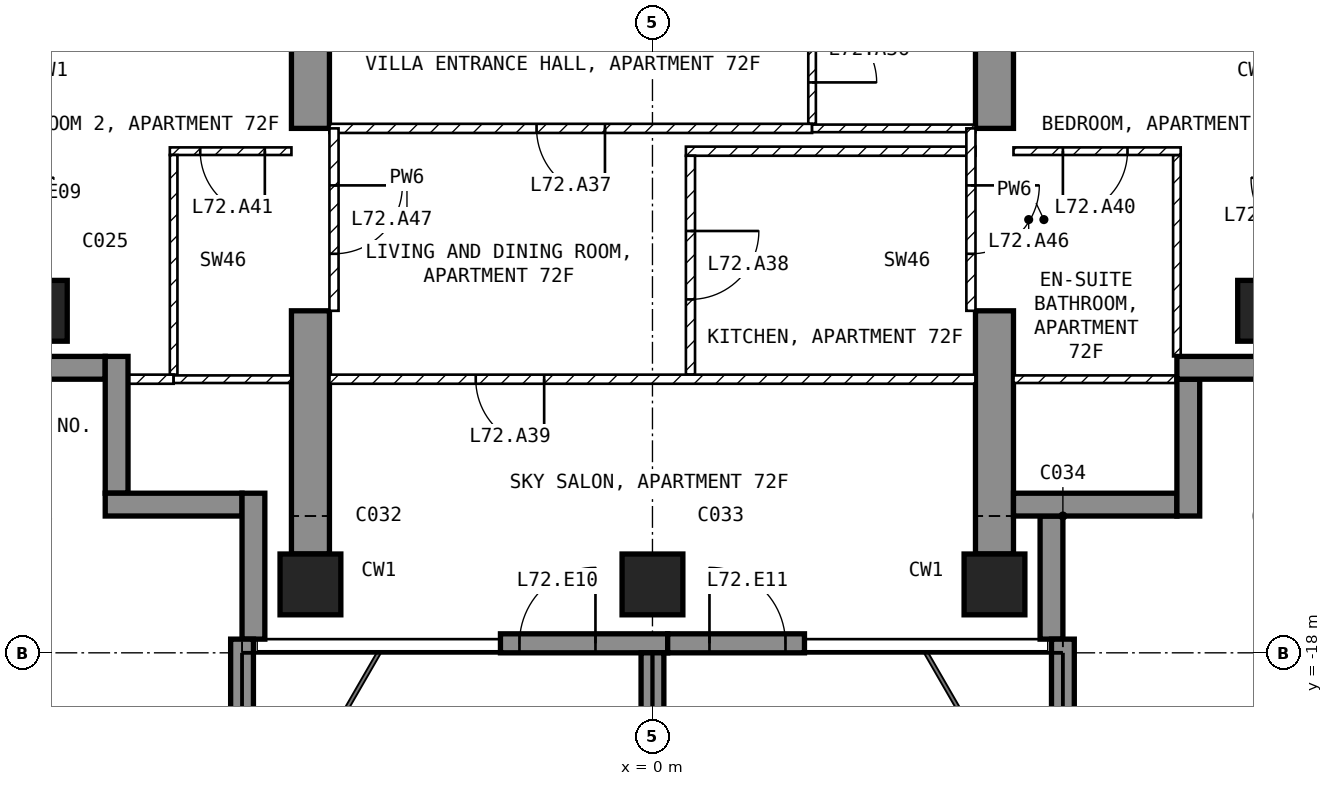
"""IFC4 building model, lengths in metres.
Left out: names, types, materials, properties, quantities, classifications, styles, units other than length and angle.
Written with IfcOpenShell. Run it as: python <this file> out.ifc"""

import sys

from ifc_helpers import new_model, si_unit, direction, frame, frame_2d, origin, origin_2d, place, context, subcontext, project, spatial, polyline, rectangle, outline, extrude, element, fill, save


model = new_model("IFC4")
c1 = context("Model", 3, precision=1e-05, world=origin(), true_north=direction((0.0, 1.0)))
c2 = subcontext(c1, "Body", "Model", "MODEL_VIEW")
j1 = project(units=[si_unit("LENGTHUNIT", "METRE"), si_unit("PLANEANGLEUNIT", "RADIAN")], contexts=[c1])
p1 = place(None, origin())
s1 = spatial("IfcSite", under=j1, at=p1, CompositionType="ELEMENT")
p2 = place(p1, origin())
s2 = spatial("IfcBuilding", under=s1, at=p2, CompositionType="ELEMENT")
p3 = place(p2, frame((0.0, 0.0, 281.5)))
s3 = spatial("IfcBuildingStorey", under=s2, at=p3, CompositionType="ELEMENT", Elevation=281.5)
for number, where, z_axis, x_axis in (
    (1, (-8.1, -13.5, -0.25), (0.0, 0.0, 1.0), (1.0, 0.0, 0.0)),
    (2, (-4.5, -17.1, -0.25), (0.0, 0.0, 1.0), (1.0, 0.0, 0.0)),
    (3, (0.0, -17.1, -0.25), (0.0, 0.0, 1.0), (1.0, 0.0, 0.0)),
    (4, (4.5, -17.1, -0.25), (0.0, 0.0, 1.0), (1.0, 0.0, 0.0)),
    (5, (8.1, -13.5, -0.25), (0.0, 0.0, 1.0), (1.0, 0.0, 0.0)),
):
    element("IfcColumn", number, at=place(p3, frame(where, z_axis=z_axis, x_axis=x_axis)), inside=s3, PredefinedType="COLUMN", context=c2, shape_type="SweptSolid", body=[
        extrude(rectangle(XDim=0.8, YDim=0.8, at=origin_2d()), origin(), (0.0, 0.0, 1.0), 3.45),
    ])
for number, where, z_axis, x_axis in (
    (6, (-4.75, -16.7, -0.25), (1.0, 0.0, 0.0), (0.0, 1.0, 0.0)),
    (7, (4.25, -16.7, -0.25), (1.0, 0.0, 0.0), (0.0, 1.0, 0.0)),
):
    element("IfcWall", number, at=place(p3, frame(where, z_axis=z_axis, x_axis=x_axis)), inside=s3, PredefinedType="SHEAR", context=c2, shape_type="SweptSolid", body=[
        extrude(outline(polyline([(0.0, 0.0), (3.2, 0.0), (3.2, 2.65), (5.6, 2.65), (5.6, 0.0), (7.7, 0.0), (7.7, 3.45), (0.0, 3.45), (0.0, 0.0)])), origin(), (0.0, 0.0, 1.0), 0.5),
    ])
p4 = place(p3, frame((-2.0, -17.875, 0.0), z_axis=(0.0, 0.0, 1.0), x_axis=(1.0, 0.0, 0.0)))
e8 = element("IfcWall", 8, at=p4, inside=s3, PredefinedType="SOLIDWALL", context=c2, shape_type="SweptSolid", body=[
    extrude(rectangle(XDim=2.2, YDim=0.25, at=frame_2d((1.1, 0.0))), origin(), (0.0, 0.0, 1.0), 3.2),
])
p5 = place(p4, frame((0.25, 0.0, 0.0)))
e9 = element("IfcOpeningElement", 9, at=p5, cuts=e8, PredefinedType="OPENING", context=c2, shape_type="SweptSolid", body=[
    extrude(rectangle(XDim=1.0, YDim=2.4, at=frame_2d((0.5, 1.2))), frame((0.0, 0.135, 0.0), z_axis=(0.0, -1.0, 0.0), x_axis=(1.0, 0.0, 0.0)), (0.0, 0.0, 1.0), 0.27),
])
p6 = place(p3, frame((0.2, -17.875, 0.0), z_axis=(0.0, 0.0, 1.0), x_axis=(1.0, 0.0, 0.0)))
e10 = element("IfcWall", 10, at=p6, inside=s3, PredefinedType="SOLIDWALL", context=c2, shape_type="SweptSolid", body=[
    extrude(rectangle(XDim=1.8, YDim=0.25, at=frame_2d((0.9, 0.0))), origin(), (0.0, 0.0, 1.0), 3.2),
])
p7 = place(p6, frame((0.55, 0.0, 0.0)))
e11 = element("IfcOpeningElement", 11, at=p7, cuts=e10, PredefinedType="OPENING", context=c2, shape_type="SweptSolid", body=[
    extrude(rectangle(XDim=1.0, YDim=2.4, at=frame_2d((0.5, 1.2))), frame((0.0, 0.135, 0.0), z_axis=(0.0, -1.0, 0.0), x_axis=(1.0, 0.0, 0.0)), (0.0, 0.0, 1.0), 0.27),
])
p8 = place(p3, frame((5.25, -17.82, 0.0), z_axis=(0.0, 0.0, 1.0), x_axis=(0.0, 1.0, 0.0)))
e12 = element("IfcWall", 12, at=p8, inside=s3, PredefinedType="SOLIDWALL", context=c2, shape_type="SweptSolid", body=[
    extrude(rectangle(XDim=1.62, YDim=0.3, at=frame_2d((0.81, 0.0))), origin(), (0.0, 0.0, 1.0), 3.2),
])
p9 = place(p3, frame((4.75, -16.05, 0.0), z_axis=(0.0, 0.0, 1.0), x_axis=(1.0, 0.0, 0.0)))
e13 = element("IfcWall", 13, at=p9, inside=s3, PredefinedType="SOLIDWALL", context=c2, shape_type="SweptSolid", body=[
    extrude(rectangle(XDim=2.15, YDim=0.3, at=frame_2d((1.075, 0.0))), origin(), (0.0, 0.0, 1.0), 3.2),
])
p10 = place(p3, frame((7.05, -16.2, 0.0), z_axis=(0.0, 0.0, 1.0), x_axis=(0.0, 1.0, 0.0)))
e14 = element("IfcWall", 14, at=p10, inside=s3, PredefinedType="SOLIDWALL", context=c2, shape_type="SweptSolid", body=[
    extrude(rectangle(XDim=1.8, YDim=0.3, at=frame_2d((0.9, 0.0))), origin(), (0.0, 0.0, 1.0), 3.2),
])
p11 = place(p3, frame((6.9, -14.25, 0.0), z_axis=(0.0, 0.0, 1.0), x_axis=(1.0, 0.0, 0.0)))
e15 = element("IfcWall", 15, at=p11, inside=s3, PredefinedType="SOLIDWALL", context=c2, shape_type="SweptSolid", body=[
    extrude(rectangle(XDim=1.85, YDim=0.3, at=frame_2d((0.925, 0.0))), origin(), (0.0, 0.0, 1.0), 3.2),
])
p12 = place(p3, frame((-8.75, -14.25, 0.0), z_axis=(0.0, 0.0, 1.0), x_axis=(1.0, 0.0, 0.0)))
e16 = element("IfcWall", 16, at=p12, inside=s3, PredefinedType="SOLIDWALL", context=c2, shape_type="SweptSolid", body=[
    extrude(rectangle(XDim=1.55, YDim=0.3, at=frame_2d((0.775, 0.0))), origin(), (0.0, 0.0, 1.0), 3.2),
])
p13 = place(p3, frame((-7.05, -14.1, 0.0), z_axis=(0.0, 0.0, 1.0), x_axis=(0.0, -1.0, 0.0)))
e17 = element("IfcWall", 17, at=p13, inside=s3, PredefinedType="SOLIDWALL", context=c2, shape_type="SweptSolid", body=[
    extrude(rectangle(XDim=1.8, YDim=0.3, at=frame_2d((0.9, 0.0))), origin(), (0.0, 0.0, 1.0), 3.2),
])
p14 = place(p3, frame((-7.2, -16.05, 0.0), z_axis=(0.0, 0.0, 1.0), x_axis=(1.0, 0.0, 0.0)))
e18 = element("IfcWall", 18, at=p14, inside=s3, PredefinedType="SOLIDWALL", context=c2, shape_type="SweptSolid", body=[
    extrude(rectangle(XDim=1.8, YDim=0.3, at=frame_2d((0.9, 0.0))), origin(), (0.0, 0.0, 1.0), 3.2),
])
p15 = place(p3, frame((-5.25, -15.9, 0.0), z_axis=(0.0, 0.0, 1.0), x_axis=(0.0, -1.0, 0.0)))
e19 = element("IfcWall", 19, at=p15, inside=s3, PredefinedType="SOLIDWALL", context=c2, shape_type="SweptSolid", body=[
    extrude(rectangle(XDim=1.92, YDim=0.3, at=frame_2d((0.96, 0.0))), origin(), (0.0, 0.0, 1.0), 3.2),
])
p16 = place(p3, frame((-5.4, -17.82, 0.0), z_axis=(0.0, 0.0, 1.0), x_axis=(0.0, -1.0, 0.0)))
e20 = element("IfcWall", 20, at=p16, inside=s3, PredefinedType="SOLIDWALL", context=c2, shape_type="SweptSolid", body=[
    extrude(rectangle(XDim=2.88, YDim=0.3, at=frame_2d((1.44, 0.0))), origin(), (0.0, 0.0, 1.0), 3.2),
])
p17 = place(p3, frame((0.0, -18.0, 0.0), z_axis=(0.0, 0.0, 1.0), x_axis=(0.0, -1.0, 0.0)))
e21 = element("IfcWall", 21, at=p17, inside=s3, PredefinedType="SOLIDWALL", context=c2, shape_type="SweptSolid", body=[
    extrude(rectangle(XDim=2.7, YDim=0.3, at=frame_2d((1.35, 0.0))), origin(), (0.0, 0.0, 1.0), 3.2),
])
p18 = place(p3, frame((5.4, -17.82, 0.0), z_axis=(0.0, 0.0, 1.0), x_axis=(0.0, -1.0, 0.0)))
e22 = element("IfcWall", 22, at=p18, inside=s3, PredefinedType="SOLIDWALL", context=c2, shape_type="SweptSolid", body=[
    extrude(rectangle(XDim=2.88, YDim=0.3, at=frame_2d((1.44, 0.0))), origin(), (0.0, 0.0, 1.0), 3.2),
])
p19 = place(p3, frame((2.1, -9.1, 0.0), z_axis=(0.0, 0.0, 1.0), x_axis=(0.0, -1.0, 0.0)))
e23 = element("IfcWall", 23, at=p19, inside=s3, PredefinedType="PARTITIONING", context=c2, shape_type="SweptSolid", body=[
    extrude(rectangle(XDim=1.94, YDim=0.1, at=frame_2d((0.97, 0.0))), origin(), (0.0, 0.0, 1.0), 3.2),
])
p20 = place(p19, frame((0.545, 0.0, 0.0)))
e24 = element("IfcOpeningElement", 24, at=p20, cuts=e23, PredefinedType="OPENING", context=c2, shape_type="SweptSolid", body=[
    extrude(rectangle(XDim=0.85, YDim=2.1, at=frame_2d((0.425, 1.05))), frame((0.0, 0.06, 0.0), z_axis=(0.0, -1.0, 0.0), x_axis=(1.0, 0.0, 0.0)), (0.0, 0.0, 1.0), 0.12),
])
p21 = place(p3, frame((2.1, -11.1, 0.0), z_axis=(0.0, 0.0, 1.0), x_axis=(-1.0, 0.0, 0.0)))
e25 = element("IfcWall", 25, at=p21, inside=s3, PredefinedType="PARTITIONING", context=c2, shape_type="SweptSolid", body=[
    extrude(rectangle(XDim=6.35, YDim=0.12, at=frame_2d((3.175, 0.0))), origin(), (0.0, 0.0, 1.0), 3.2),
])
p22 = place(p21, frame((2.725, 0.0, 0.0)))
e26 = element("IfcOpeningElement", 26, at=p22, cuts=e25, PredefinedType="OPENING", context=c2, shape_type="SweptSolid", body=[
    extrude(rectangle(XDim=0.9, YDim=2.1, at=frame_2d((0.45, 1.05))), frame((0.0, 0.07, 0.0), z_axis=(0.0, -1.0, 0.0), x_axis=(1.0, 0.0, 0.0)), (0.0, 0.0, 1.0), 0.14),
])
p23 = place(p3, frame((4.25, -11.1, 0.0), z_axis=(0.0, 0.0, 1.0), x_axis=(-1.0, 0.0, 0.0)))
e27 = element("IfcWall", 27, at=p23, inside=s3, PredefinedType="PARTITIONING", context=c2, shape_type="SweptSolid", body=[
    extrude(rectangle(XDim=2.15, YDim=0.1, at=frame_2d((1.075, 0.0))), origin(), (0.0, 0.0, 1.0), 3.2),
])
p24 = place(p3, frame((4.25, -11.4, 0.0), z_axis=(0.0, 0.0, 1.0), x_axis=(-1.0, 0.0, 0.0)))
e28 = element("IfcWall", 28, at=p24, inside=s3, PredefinedType="PARTITIONING", context=c2, shape_type="SweptSolid", body=[
    extrude(rectangle(XDim=3.81, YDim=0.12, at=frame_2d((1.905, 0.0))), origin(), (0.0, 0.0, 1.0), 3.2),
])
p25 = place(p3, frame((0.5, -11.46, 0.0), z_axis=(0.0, 0.0, 1.0), x_axis=(0.0, -1.0, 0.0)))
e29 = element("IfcWall", 29, at=p25, inside=s3, PredefinedType="PARTITIONING", context=c2, shape_type="SweptSolid", body=[
    extrude(rectangle(XDim=2.88, YDim=0.12, at=frame_2d((1.44, 0.0))), origin(), (0.0, 0.0, 1.0), 3.2),
])
p26 = place(p25, frame((0.99, 0.0, 0.0)))
e30 = element("IfcOpeningElement", 30, at=p26, cuts=e29, PredefinedType="OPENING", context=c2, shape_type="SweptSolid", body=[
    extrude(rectangle(XDim=0.9, YDim=2.1, at=frame_2d((0.45, 1.05))), frame((0.0, 0.07, 0.0), z_axis=(0.0, -1.0, 0.0), x_axis=(1.0, 0.0, 0.0)), (0.0, 0.0, 1.0), 0.14),
])
p27 = place(p3, frame((4.25, -14.4, 0.0), z_axis=(0.0, 0.0, 1.0), x_axis=(-1.0, 0.0, 0.0)))
e31 = element("IfcWall", 31, at=p27, inside=s3, PredefinedType="PARTITIONING", context=c2, shape_type="SweptSolid", body=[
    extrude(rectangle(XDim=8.5, YDim=0.12, at=frame_2d((4.25, 0.0))), origin(), (0.0, 0.0, 1.0), 3.2),
])
p28 = place(p27, frame((5.675, 0.0, 0.0)))
e32 = element("IfcOpeningElement", 32, at=p28, cuts=e31, PredefinedType="OPENING", context=c2, shape_type="SweptSolid", body=[
    extrude(rectangle(XDim=0.9, YDim=2.1, at=frame_2d((0.45, 1.05))), frame((0.0, 0.07, 0.0), z_axis=(0.0, -1.0, 0.0), x_axis=(1.0, 0.0, 0.0)), (0.0, 0.0, 1.0), 0.14),
])
p29 = place(p3, frame((6.9, -14.1, 0.0), z_axis=(0.0, 0.0, 1.0), x_axis=(0.0, 1.0, 0.0)))
e33 = element("IfcWall", 33, at=p29, inside=s3, PredefinedType="PARTITIONING", context=c2, shape_type="SweptSolid", body=[
    extrude(rectangle(XDim=2.65, YDim=0.1, at=frame_2d((1.325, 0.0))), origin(), (0.0, 0.0, 1.0), 3.2),
])
p30 = place(p3, frame((6.95, -11.4, 0.0), z_axis=(0.0, 0.0, 1.0), x_axis=(-1.0, 0.0, 0.0)))
e34 = element("IfcWall", 34, at=p30, inside=s3, PredefinedType="PARTITIONING", context=c2, shape_type="SweptSolid", body=[
    extrude(rectangle(XDim=2.2, YDim=0.1, at=frame_2d((1.1, 0.0))), origin(), (0.0, 0.0, 1.0), 3.2),
])
p31 = place(p30, frame((0.7, 0.0, 0.0)))
e35 = element("IfcOpeningElement", 35, at=p31, cuts=e34, PredefinedType="OPENING", context=c2, shape_type="SweptSolid", body=[
    extrude(rectangle(XDim=0.85, YDim=2.1, at=frame_2d((0.425, 1.05))), frame((0.0, 0.06, 0.0), z_axis=(0.0, -1.0, 0.0), x_axis=(1.0, 0.0, 0.0)), (0.0, 0.0, 1.0), 0.12),
])
p32 = place(p3, frame((7.12, -14.4, 0.0), z_axis=(0.0, 0.0, 1.0), x_axis=(-1.0, 0.0, 0.0)))
e36 = element("IfcWall", 36, at=p32, inside=s3, PredefinedType="PARTITIONING", context=c2, shape_type="SweptSolid", body=[
    extrude(rectangle(XDim=2.37, YDim=0.1, at=frame_2d((1.185, 0.0))), origin(), (0.0, 0.0, 1.0), 3.2),
])
p33 = place(p3, frame((-4.75, -11.4, 0.0), z_axis=(0.0, 0.0, 1.0), x_axis=(-1.0, 0.0, 0.0)))
e37 = element("IfcWall", 37, at=p33, inside=s3, PredefinedType="PARTITIONING", context=c2, shape_type="SweptSolid", body=[
    extrude(rectangle(XDim=1.6, YDim=0.1, at=frame_2d((0.8, 0.0))), origin(), (0.0, 0.0, 1.0), 3.2),
])
p34 = place(p33, frame((0.35, 0.0, 0.0)))
e38 = element("IfcOpeningElement", 38, at=p34, cuts=e37, PredefinedType="OPENING", context=c2, shape_type="SweptSolid", body=[
    extrude(rectangle(XDim=0.85, YDim=2.1, at=frame_2d((0.425, 1.05))), frame((0.0, 0.06, 0.0), z_axis=(0.0, -1.0, 0.0), x_axis=(1.0, 0.0, 0.0)), (0.0, 0.0, 1.0), 0.12),
])
p35 = place(p3, frame((-6.3, -11.45, 0.0), z_axis=(0.0, 0.0, 1.0), x_axis=(0.0, -1.0, 0.0)))
e39 = element("IfcWall", 39, at=p35, inside=s3, PredefinedType="PARTITIONING", context=c2, shape_type="SweptSolid", body=[
    extrude(rectangle(XDim=2.89, YDim=0.1, at=frame_2d((1.445, 0.0))), origin(), (0.0, 0.0, 1.0), 3.2),
])
p36 = place(p3, frame((-6.3, -14.4, 0.0), z_axis=(0.0, 0.0, 1.0), x_axis=(-1.0, 0.0, 0.0)))
e40 = element("IfcWall", 40, at=p36, inside=s3, PredefinedType="PARTITIONING", context=c2, shape_type="SweptSolid", body=[
    extrude(rectangle(XDim=0.82, YDim=0.12, at=frame_2d((0.41, 0.0))), origin(), (0.0, 0.0, 1.0), 3.2),
])
p37 = place(p3, frame((-4.75, -14.4, 0.0), z_axis=(0.0, 0.0, 1.0), x_axis=(-1.0, 0.0, 0.0)))
e41 = element("IfcWall", 41, at=p37, inside=s3, PredefinedType="PARTITIONING", context=c2, shape_type="SweptSolid", body=[
    extrude(rectangle(XDim=1.55, YDim=0.1, at=frame_2d((0.775, 0.0))), origin(), (0.0, 0.0, 1.0), 3.2),
])
p38 = place(p3, frame((4.19, -11.1, 0.0), z_axis=(0.0, 0.0, 1.0), x_axis=(0.0, -1.0, 0.0)))
e42 = element("IfcWall", 42, at=p38, inside=s3, PredefinedType="PARTITIONING", context=c2, shape_type="SweptSolid", body=[
    extrude(rectangle(XDim=2.4, YDim=0.12, at=frame_2d((1.2, 0.0))), origin(), (0.0, 0.0, 1.0), 2.4),
])
p39 = place(p38, frame((0.75, 0.0, 0.0)))
e43 = element("IfcOpeningElement", 43, at=p39, cuts=e42, PredefinedType="OPENING", context=c2, shape_type="SweptSolid", body=[
    extrude(rectangle(XDim=0.9, YDim=2.1, at=frame_2d((0.45, 1.05))), frame((0.0, 0.07, 0.0), z_axis=(0.0, -1.0, 0.0), x_axis=(1.0, 0.0, 0.0)), (0.0, 0.0, 1.0), 0.14),
])
p40 = place(p3, frame((-4.19, -11.1, 0.0), z_axis=(0.0, 0.0, 1.0), x_axis=(0.0, -1.0, 0.0)))
e44 = element("IfcWall", 44, at=p40, inside=s3, PredefinedType="PARTITIONING", context=c2, shape_type="SweptSolid", body=[
    extrude(rectangle(XDim=2.4, YDim=0.12, at=frame_2d((1.2, 0.0))), origin(), (0.0, 0.0, 1.0), 2.4),
])
p41 = place(p40, frame((0.75, 0.0, 0.0)))
e45 = element("IfcOpeningElement", 45, at=p41, cuts=e44, PredefinedType="OPENING", context=c2, shape_type="SweptSolid", body=[
    extrude(rectangle(XDim=0.9, YDim=2.1, at=frame_2d((0.45, 1.05))), frame((0.0, 0.07, 0.0), z_axis=(0.0, -1.0, 0.0), x_axis=(1.0, 0.0, 0.0)), (0.0, 0.0, 1.0), 0.14),
])
p42 = place(p5, origin())
e46 = element("IfcDoor", 46, at=p42, inside=s3, OperationType="SINGLE_SWING_RIGHT", PredefinedType="DOOR", context=c2, shape_type="SweptSolid", body=[
    extrude(rectangle(XDim=1.0, YDim=2.4, at=frame_2d((0.5, 1.2))), frame((0.0, 0.025, 0.0), z_axis=(0.0, -1.0, 0.0), x_axis=(1.0, 0.0, 0.0)), (0.0, 0.0, 1.0), 0.05),
])
fill(e9, e46)
p43 = place(p7, origin())
e47 = element("IfcDoor", 47, at=p43, inside=s3, OperationType="SINGLE_SWING_LEFT", PredefinedType="DOOR", context=c2, shape_type="SweptSolid", body=[
    extrude(rectangle(XDim=1.0, YDim=2.4, at=frame_2d((0.5, 1.2))), frame((0.0, 0.025, 0.0), z_axis=(0.0, -1.0, 0.0), x_axis=(1.0, 0.0, 0.0)), (0.0, 0.0, 1.0), 0.05),
])
fill(e11, e47)
p44 = place(p20, origin())
e48 = element("IfcDoor", 48, at=p44, inside=s3, OperationType="SINGLE_SWING_RIGHT", PredefinedType="DOOR", context=c2, shape_type="SweptSolid", body=[
    extrude(rectangle(XDim=0.85, YDim=2.1, at=frame_2d((0.425, 1.05))), frame((0.0, 0.025, 0.0), z_axis=(0.0, -1.0, 0.0), x_axis=(1.0, 0.0, 0.0)), (0.0, 0.0, 1.0), 0.05),
])
fill(e24, e48)
p45 = place(p22, origin())
e49 = element("IfcDoor", 49, at=p45, inside=s3, OperationType="SINGLE_SWING_LEFT", PredefinedType="DOOR", context=c2, shape_type="SweptSolid", body=[
    extrude(rectangle(XDim=0.9, YDim=2.1, at=frame_2d((0.45, 1.05))), frame((0.0, 0.025, 0.0), z_axis=(0.0, -1.0, 0.0), x_axis=(1.0, 0.0, 0.0)), (0.0, 0.0, 1.0), 0.05),
])
fill(e26, e49)
p46 = place(p26, origin())
e50 = element("IfcDoor", 50, at=p46, inside=s3, OperationType="SINGLE_SWING_LEFT", PredefinedType="DOOR", context=c2, shape_type="SweptSolid", body=[
    extrude(rectangle(XDim=0.9, YDim=2.1, at=frame_2d((0.45, 1.05))), frame((0.0, 0.025, 0.0), z_axis=(0.0, -1.0, 0.0), x_axis=(1.0, 0.0, 0.0)), (0.0, 0.0, 1.0), 0.05),
])
fill(e30, e50)
p47 = place(p28, origin())
e51 = element("IfcDoor", 51, at=p47, inside=s3, OperationType="SINGLE_SWING_LEFT", PredefinedType="DOOR", context=c2, shape_type="SweptSolid", body=[
    extrude(rectangle(XDim=0.9, YDim=2.1, at=frame_2d((0.45, 1.05))), frame((0.0, 0.025, 0.0), z_axis=(0.0, -1.0, 0.0), x_axis=(1.0, 0.0, 0.0)), (0.0, 0.0, 1.0), 0.05),
])
fill(e32, e51)
p48 = place(p31, origin())
e52 = element("IfcDoor", 52, at=p48, inside=s3, OperationType="SINGLE_SWING_RIGHT", PredefinedType="DOOR", context=c2, shape_type="SweptSolid", body=[
    extrude(rectangle(XDim=0.85, YDim=2.1, at=frame_2d((0.425, 1.05))), frame((0.0, 0.025, 0.0), z_axis=(0.0, -1.0, 0.0), x_axis=(1.0, 0.0, 0.0)), (0.0, 0.0, 1.0), 0.05),
])
fill(e35, e52)
p49 = place(p34, origin())
e53 = element("IfcDoor", 53, at=p49, inside=s3, OperationType="SINGLE_SWING_LEFT", PredefinedType="DOOR", context=c2, shape_type="SweptSolid", body=[
    extrude(rectangle(XDim=0.85, YDim=2.1, at=frame_2d((0.425, 1.05))), frame((0.0, 0.025, 0.0), z_axis=(0.0, -1.0, 0.0), x_axis=(1.0, 0.0, 0.0)), (0.0, 0.0, 1.0), 0.05),
])
fill(e38, e53)
p50 = place(p39, origin())
e54 = element("IfcDoor", 54, at=p50, inside=s3, OperationType="SINGLE_SWING_LEFT", PredefinedType="DOOR", context=c2, shape_type="SweptSolid", body=[
    extrude(rectangle(XDim=0.9, YDim=2.1, at=frame_2d((0.45, 1.05))), frame((0.0, 0.025, 0.0), z_axis=(0.0, -1.0, 0.0), x_axis=(1.0, 0.0, 0.0)), (0.0, 0.0, 1.0), 0.05),
])
fill(e43, e54)
p51 = place(p41, origin())
e55 = element("IfcDoor", 55, at=p51, inside=s3, OperationType="SINGLE_SWING_LEFT", PredefinedType="DOOR", context=c2, shape_type="SweptSolid", body=[
    extrude(rectangle(XDim=0.9, YDim=2.1, at=frame_2d((0.45, 1.05))), frame((0.0, 0.025, 0.0), z_axis=(0.0, -1.0, 0.0), x_axis=(1.0, 0.0, 0.0)), (0.0, 0.0, 1.0), 0.05),
])
fill(e45, e55)
save(model, sys.argv[1])
